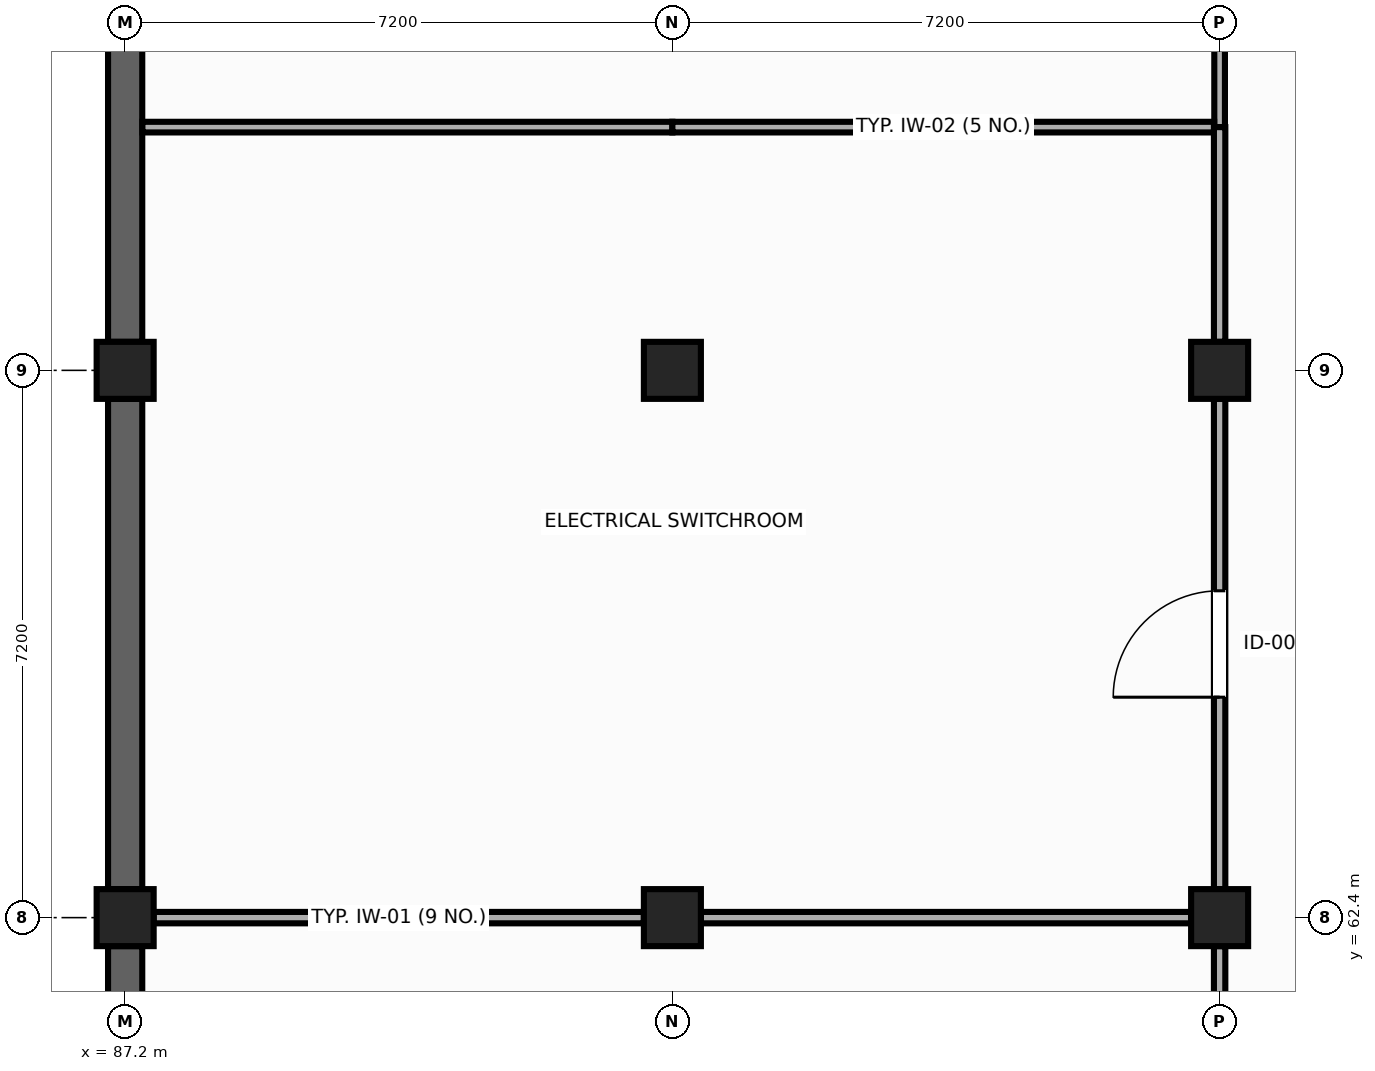
"""IFC4 building model, lengths in metres.
Left out: names, types, materials, properties, quantities, classifications, styles, units other than length and angle.
Written with IfcOpenShell. Run it as: python <this file> out.ifc"""

import sys

from ifc_helpers import new_model, si_unit, direction, frame, frame_2d, origin, origin_2d, place, context, subcontext, project, spatial, rectangle, extrude, element, fill, save


model = new_model("IFC4")
c1 = context("Model", 3, precision=1e-05, world=origin(), true_north=direction((0.0, 1.0)))
c2 = subcontext(c1, "Body", "Model", "MODEL_VIEW")
j1 = project(units=[si_unit("LENGTHUNIT", "METRE"), si_unit("PLANEANGLEUNIT", "RADIAN")], contexts=[c1])
p1 = place(None, origin())
s1 = spatial("IfcSite", under=j1, at=p1, CompositionType="ELEMENT")
p2 = place(p1, origin())
s2 = spatial("IfcBuilding", under=s1, at=p2, CompositionType="ELEMENT")
p3 = place(p2, frame((0.0, 0.0, -4.8)))
s3 = spatial("IfcBuildingStorey", under=s2, at=p3, CompositionType="ELEMENT", Elevation=-4.8)
p4 = place(p3, frame((87.2, 62.4, 0.0), z_axis=(0.0, 0.0, 1.0), x_axis=(0.0, 1.0, 0.0)))
e1 = element("IfcColumn", 1, at=p4, inside=s3, PredefinedType="COLUMN", context=c2, shape_type="SweptSolid", body=[
    extrude(rectangle(XDim=0.75, YDim=0.75, at=origin_2d()), origin(), (0.0, 0.0, 1.0), 4.8),
])
for number, where, z_axis, x_axis in (
    (2, (94.4, 62.4, 0.0), (0.0, 0.0, 1.0), (1.0, 0.0, 0.0)),
    (3, (101.6, 62.4, 0.0), (0.0, 0.0, 1.0), (1.0, 0.0, 0.0)),
):
    element("IfcColumn", number, at=place(p3, frame(where, z_axis=z_axis, x_axis=x_axis)), inside=s3, PredefinedType="COLUMN", context=c2, shape_type="SweptSolid", body=[
        extrude(rectangle(XDim=0.75, YDim=0.75, at=origin_2d()), origin(), (0.0, 0.0, 1.0), 4.45),
    ])
p5 = place(p3, frame((87.2, 69.6, 0.0), z_axis=(0.0, 0.0, 1.0), x_axis=(1.0, 0.0, 0.0)))
e4 = element("IfcColumn", 4, at=p5, inside=s3, PredefinedType="COLUMN", context=c2, shape_type="SweptSolid", body=[
    extrude(rectangle(XDim=0.75, YDim=0.75, at=origin_2d()), origin(), (0.0, 0.0, 1.0), 4.8),
])
for number, where, z_axis, x_axis in (
    (5, (94.4, 69.6, 0.0), (0.0, 0.0, 1.0), (1.0, 0.0, 0.0)),
    (6, (101.6, 69.6, 0.0), (0.0, 0.0, 1.0), (0.0, 1.0, 0.0)),
):
    element("IfcColumn", number, at=place(p3, frame(where, z_axis=z_axis, x_axis=x_axis)), inside=s3, PredefinedType="COLUMN", context=c2, shape_type="SweptSolid", body=[
        extrude(rectangle(XDim=0.75, YDim=0.75, at=origin_2d()), origin(), (0.0, 0.0, 1.0), 4.45),
    ])
p6 = place(p3, frame((87.2, 55.575, 0.0), z_axis=(0.0, 0.0, 1.0), x_axis=(0.0, 1.0, 0.0)))
e7 = element("IfcWall", 7, at=p6, inside=s3, PredefinedType="SHEAR", context=c2, shape_type="SweptSolid", body=[
    extrude(rectangle(XDim=6.45, YDim=0.45, at=frame_2d((3.225, 0.0))), origin(), (0.0, 0.0, 1.0), 4.45),
])
p7 = place(p3, frame((87.2, 62.775, 0.0), z_axis=(0.0, 0.0, 1.0), x_axis=(0.0, 1.0, 0.0)))
e8 = element("IfcWall", 8, at=p7, inside=s3, PredefinedType="SHEAR", context=c2, shape_type="SweptSolid", body=[
    extrude(rectangle(XDim=6.45, YDim=0.45, at=frame_2d((3.225, 0.0))), origin(), (0.0, 0.0, 1.0), 4.45),
])
p8 = place(p3, frame((87.2, 69.975, 0.0), z_axis=(0.0, 0.0, 1.0), x_axis=(0.0, 1.0, 0.0)))
e9 = element("IfcWall", 9, at=p8, inside=s3, PredefinedType="SHEAR", context=c2, shape_type="SweptSolid", body=[
    extrude(rectangle(XDim=6.45, YDim=0.45, at=frame_2d((3.225, 0.0))), origin(), (0.0, 0.0, 1.0), 4.45),
])
p9 = place(p3, frame((101.6, 72.8, 0.0), z_axis=(0.0, 0.0, 1.0), x_axis=(0.0, 1.0, 0.0)))
e10 = element("IfcWall", 10, at=p9, inside=s3, PredefinedType="PARTITIONING", context=c2, shape_type="SweptSolid", body=[
    extrude(rectangle(XDim=3.625, YDim=0.14, at=frame_2d((1.812, 0.0))), origin(), (0.0, 0.0, 1.0), 3.645),
])
p10 = place(p3, frame((87.427, 72.8, 0.0), z_axis=(0.0, 0.0, 1.0), x_axis=(1.0, 0.0, 0.0)))
e11 = element("IfcWall", 11, at=p10, inside=s3, PredefinedType="PARTITIONING", context=c2, shape_type="SweptSolid", body=[
    extrude(rectangle(XDim=6.973, YDim=0.14, at=frame_2d((3.486, 0.0))), origin(), (0.0, 0.0, 1.0), 3.645),
])
p11 = place(p3, frame((94.4, 72.8, 0.0), z_axis=(0.0, 0.0, 1.0), x_axis=(1.0, 0.0, 0.0)))
e12 = element("IfcWall", 12, at=p11, inside=s3, PredefinedType="PARTITIONING", context=c2, shape_type="SweptSolid", body=[
    extrude(rectangle(XDim=7.128, YDim=0.14, at=frame_2d((3.564, 0.0))), origin(), (0.0, 0.0, 1.0), 3.645),
])
p12 = place(p3, frame((101.6, 55.575, 0.0), z_axis=(0.0, 0.0, 1.0), x_axis=(0.0, 1.0, 0.0)))
e13 = element("IfcWall", 13, at=p12, inside=s3, PredefinedType="PARTITIONING", context=c2, shape_type="SweptSolid", body=[
    extrude(rectangle(XDim=6.45, YDim=0.15, at=frame_2d((3.225, 0.0))), origin(), (0.0, 0.0, 1.0), 3.645),
])
p13 = place(p3, frame((101.225, 62.4, 0.0), z_axis=(0.0, 0.0, 1.0), x_axis=(-1.0, 0.0, 0.0)))
e14 = element("IfcWall", 14, at=p13, inside=s3, PredefinedType="PARTITIONING", context=c2, shape_type="SweptSolid", body=[
    extrude(rectangle(XDim=6.45, YDim=0.15, at=frame_2d((3.225, 0.0))), origin(), (0.0, 0.0, 1.0), 3.495),
])
p14 = place(p3, frame((94.025, 62.4, 0.0), z_axis=(0.0, 0.0, 1.0), x_axis=(-1.0, 0.0, 0.0)))
e15 = element("IfcWall", 15, at=p14, inside=s3, PredefinedType="PARTITIONING", context=c2, shape_type="SweptSolid", body=[
    extrude(rectangle(XDim=6.45, YDim=0.15, at=frame_2d((3.225, 0.0))), origin(), (0.0, 0.0, 1.0), 3.495),
])
p15 = place(p3, frame((101.6, 62.775, 0.0), z_axis=(0.0, 0.0, 1.0), x_axis=(0.0, 1.0, 0.0)))
e16 = element("IfcWall", 16, at=p15, inside=s3, PredefinedType="PARTITIONING", context=c2, shape_type="SweptSolid", body=[
    extrude(rectangle(XDim=6.45, YDim=0.15, at=frame_2d((3.225, 0.0))), origin(), (0.0, 0.0, 1.0), 3.645),
])
p16 = place(p15, frame((2.525, 0.0, 0.0)))
e17 = element("IfcOpeningElement", 17, at=p16, cuts=e16, PredefinedType="OPENING", context=c2, shape_type="SweptSolid", body=[
    extrude(rectangle(XDim=1.4, YDim=2.2, at=frame_2d((0.7, 1.1))), frame((0.0, 0.085, 0.0), z_axis=(0.0, -1.0, 0.0), x_axis=(1.0, 0.0, 0.0)), (0.0, 0.0, 1.0), 0.17),
])
p17 = place(p3, frame((101.6, 69.975, 0.0), z_axis=(0.0, 0.0, 1.0), x_axis=(0.0, 1.0, 0.0)))
e18 = element("IfcWall", 18, at=p17, inside=s3, PredefinedType="PARTITIONING", context=c2, shape_type="SweptSolid", body=[
    extrude(rectangle(XDim=2.825, YDim=0.15, at=frame_2d((1.413, 0.0))), origin(), (0.0, 0.0, 1.0), 3.645),
])
p18 = place(p16, origin())
e19 = element("IfcDoor", 19, at=p18, inside=s3, OperationType="SINGLE_SWING_LEFT", PredefinedType="DOOR", context=c2, shape_type="SweptSolid", body=[
    extrude(rectangle(XDim=1.4, YDim=2.2, at=frame_2d((0.7, 1.1))), frame((0.0, 0.025, 0.0), z_axis=(0.0, -1.0, 0.0), x_axis=(1.0, 0.0, 0.0)), (0.0, 0.0, 1.0), 0.05),
])
fill(e17, e19)
save(model, sys.argv[1])
